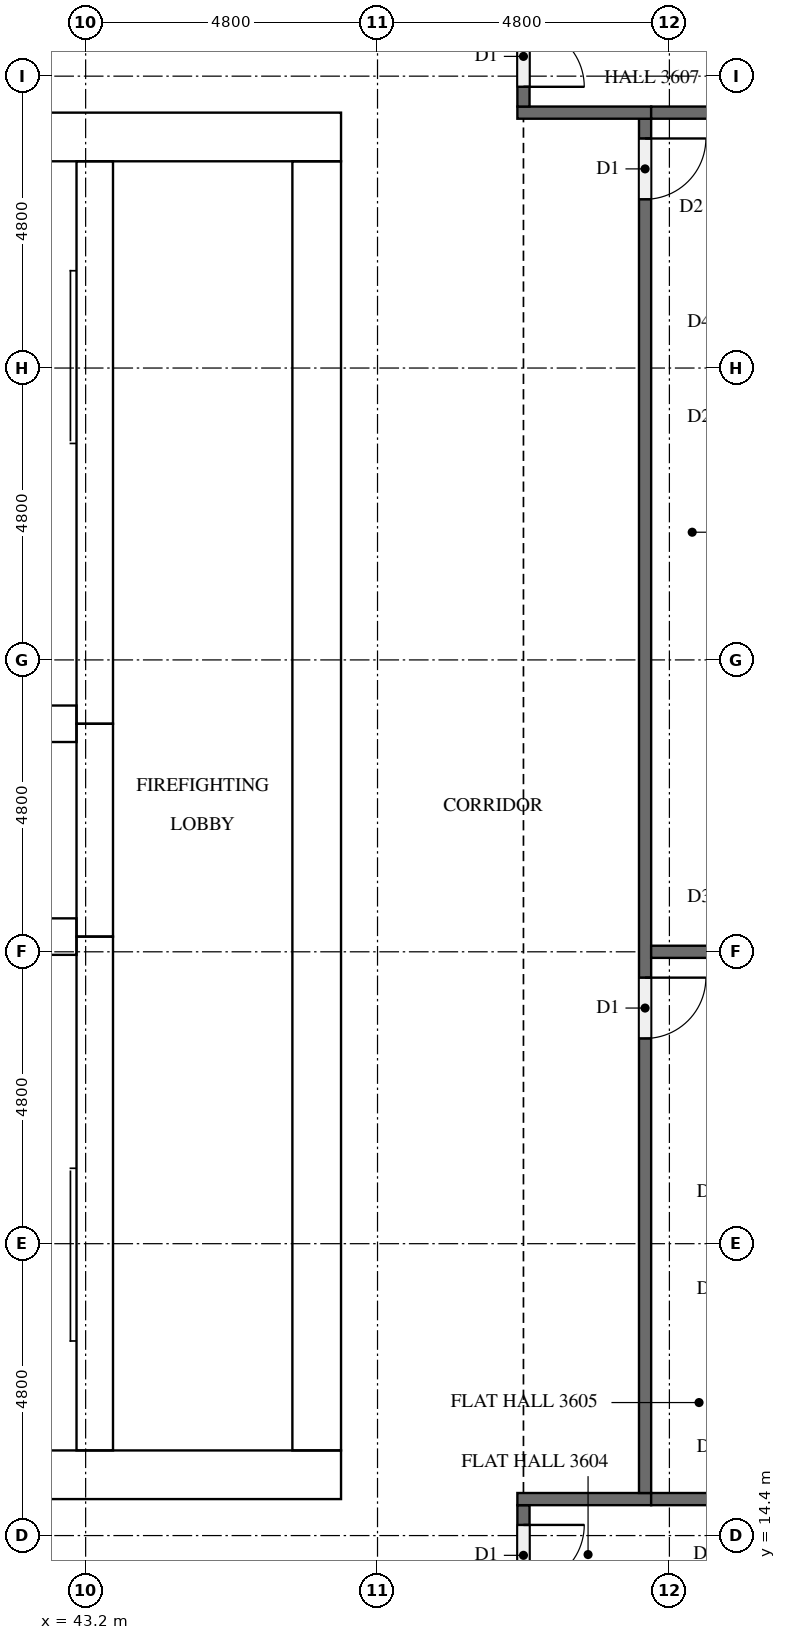
"""IFC4 building model, lengths in metres.
Left out: names, types, materials, properties, quantities, classifications, styles, units other than length and angle.
Written with IfcOpenShell. Run it as: python <this file> out.ifc"""

import sys

from ifc_helpers import new_model, si_unit, direction, frame, frame_2d, origin, place, context, subcontext, project, spatial, rectangle, extrude, element, fill, save


model = new_model("IFC4")
c1 = context("Model", 3, precision=1e-05, world=origin(), true_north=direction((0.0, 1.0)))
c2 = subcontext(c1, "Body", "Model", "MODEL_VIEW")
j1 = project(units=[si_unit("LENGTHUNIT", "METRE"), si_unit("PLANEANGLEUNIT", "RADIAN")], contexts=[c1])
p1 = place(None, origin())
s1 = spatial("IfcSite", under=j1, at=p1, CompositionType="ELEMENT")
p2 = place(p1, origin())
s2 = spatial("IfcBuilding", under=s1, at=p2, CompositionType="ELEMENT")
p3 = place(p2, frame((0.0, 0.0, 140.1)))
s3 = spatial("IfcBuildingStorey", under=s2, at=p3, CompositionType="ELEMENT", Elevation=140.1)
p4 = place(p3, frame((15.0, 15.4, 0.0), z_axis=(0.0, 0.0, 1.0), x_axis=(1.0, 0.0, 0.0)))
e1 = element("IfcWall", 1, at=p4, inside=s3, PredefinedType="SHEAR", context=c2, shape_type="SweptSolid", body=[
    extrude(rectangle(XDim=32.4, YDim=0.8, at=frame_2d((16.2, 0.0))), origin(), (0.0, 0.0, 1.0), 3.1),
])
p5 = place(p4, frame((15.3, 0.0, 0.0)))
e2 = element("IfcOpeningElement", 2, at=p5, cuts=e1, PredefinedType="OPENING", context=c2, shape_type="SweptSolid", body=[
    extrude(rectangle(XDim=1.8, YDim=2.1, at=frame_2d((0.9, 1.05))), frame((0.0, 0.41, 0.0), z_axis=(0.0, -1.0, 0.0), x_axis=(1.0, 0.0, 0.0)), (0.0, 0.0, 1.0), 0.82),
])
p6 = place(p3, frame((15.0, 37.4, 0.0), z_axis=(0.0, 0.0, 1.0), x_axis=(1.0, 0.0, 0.0)))
e3 = element("IfcWall", 3, at=p6, inside=s3, PredefinedType="SHEAR", context=c2, shape_type="SweptSolid", body=[
    extrude(rectangle(XDim=32.4, YDim=0.8, at=frame_2d((16.2, 0.0))), origin(), (0.0, 0.0, 1.0), 3.1),
])
p7 = place(p6, frame((15.3, 0.0, 0.0)))
e4 = element("IfcOpeningElement", 4, at=p7, cuts=e3, PredefinedType="OPENING", context=c2, shape_type="SweptSolid", body=[
    extrude(rectangle(XDim=1.8, YDim=2.1, at=frame_2d((0.9, 1.05))), frame((0.0, 0.41, 0.0), z_axis=(0.0, -1.0, 0.0), x_axis=(1.0, 0.0, 0.0)), (0.0, 0.0, 1.0), 0.82),
])
p8 = place(p6, frame((1.51, 0.0, 0.0)))
e5 = element("IfcOpeningElement", 5, at=p8, cuts=e3, PredefinedType="OPENING", context=c2, shape_type="SweptSolid", body=[
    extrude(rectangle(XDim=1.0, YDim=2.1, at=frame_2d((0.5, 1.05))), frame((0.0, 0.41, 0.0), z_axis=(0.0, -1.0, 0.0), x_axis=(1.0, 0.0, 0.0)), (0.0, 0.0, 1.0), 0.82),
])
p9 = place(p6, frame((5.11, 0.0, 0.0)))
e6 = element("IfcOpeningElement", 6, at=p9, cuts=e3, PredefinedType="OPENING", context=c2, shape_type="SweptSolid", body=[
    extrude(rectangle(XDim=1.0, YDim=2.1, at=frame_2d((0.5, 1.05))), frame((0.0, 0.41, 0.0), z_axis=(0.0, -1.0, 0.0), x_axis=(1.0, 0.0, 0.0)), (0.0, 0.0, 1.0), 0.82),
])
p10 = place(p3, frame((47.0, 15.8, 0.0), z_axis=(0.0, 0.0, 1.0), x_axis=(0.0, 1.0, 0.0)))
e7 = element("IfcWall", 7, at=p10, inside=s3, PredefinedType="SHEAR", context=c2, shape_type="SweptSolid", body=[
    extrude(rectangle(XDim=21.2, YDim=0.8, at=frame_2d((10.6, 0.0))), origin(), (0.0, 0.0, 1.0), 3.1),
])
p11 = place(p10, frame((10.3, 0.0, 0.0)))
e8 = element("IfcOpeningElement", 8, at=p11, cuts=e7, PredefinedType="OPENING", context=c2, shape_type="SweptSolid", body=[
    extrude(rectangle(XDim=1.2, YDim=2.1, at=frame_2d((0.6, 1.05))), frame((0.0, 0.41, 0.0), z_axis=(0.0, -1.0, 0.0), x_axis=(1.0, 0.0, 0.0)), (0.0, 0.0, 1.0), 0.82),
])
p12 = place(p3, frame((43.35, 15.8, 0.0), z_axis=(0.0, 0.0, 1.0), x_axis=(0.0, 1.0, 0.0)))
e9 = element("IfcWall", 9, at=p12, inside=s3, PredefinedType="SHEAR", context=c2, shape_type="SweptSolid", body=[
    extrude(rectangle(XDim=8.45, YDim=0.6, at=frame_2d((4.225, 0.0))), origin(), (0.0, 0.0, 1.0), 3.1),
])
p13 = place(p12, frame((0.4, 0.0, 0.0)))
e10 = element("IfcOpeningElement", 10, at=p13, cuts=e9, PredefinedType="OPENING", context=c2, shape_type="SweptSolid", body=[
    extrude(rectangle(XDim=1.2, YDim=2.1, at=frame_2d((0.6, 1.05))), frame((0.0, 0.31, 0.0), z_axis=(0.0, -1.0, 0.0), x_axis=(1.0, 0.0, 0.0)), (0.0, 0.0, 1.0), 0.62),
])
p14 = place(p3, frame((43.35, 24.25, 0.0), z_axis=(0.0, 0.0, 1.0), x_axis=(0.0, 1.0, 0.0)))
e11 = element("IfcWall", 11, at=p14, inside=s3, PredefinedType="SHEAR", context=c2, shape_type="SweptSolid", body=[
    extrude(rectangle(XDim=3.5, YDim=0.6, at=frame_2d((1.75, 0.0))), origin(), (0.0, 0.0, 1.0), 3.1),
])
p15 = place(p14, frame((1.2, 0.0, 0.0)))
e12 = element("IfcOpeningElement", 12, at=p15, cuts=e11, PredefinedType="OPENING", context=c2, shape_type="SweptSolid", body=[
    extrude(rectangle(XDim=1.1, YDim=2.1, at=frame_2d((0.55, 1.05))), frame((0.0, 0.31, 0.0), z_axis=(0.0, -1.0, 0.0), x_axis=(1.0, 0.0, 0.0)), (0.0, 0.0, 1.0), 0.62),
])
p16 = place(p3, frame((43.35, 27.75, 0.0), z_axis=(0.0, 0.0, 1.0), x_axis=(0.0, 1.0, 0.0)))
e13 = element("IfcWall", 13, at=p16, inside=s3, PredefinedType="SHEAR", context=c2, shape_type="SweptSolid", body=[
    extrude(rectangle(XDim=9.25, YDim=0.6, at=frame_2d((4.625, 0.0))), origin(), (0.0, 0.0, 1.0), 3.1),
])
p17 = place(p16, frame((7.65, 0.0, 0.0)))
e14 = element("IfcOpeningElement", 14, at=p17, cuts=e13, PredefinedType="OPENING", context=c2, shape_type="SweptSolid", body=[
    extrude(rectangle(XDim=1.2, YDim=2.1, at=frame_2d((0.6, 1.05))), frame((0.0, 0.31, 0.0), z_axis=(0.0, -1.0, 0.0), x_axis=(1.0, 0.0, 0.0)), (0.0, 0.0, 1.0), 0.62),
])
for number, where, z_axis, x_axis in (
    (15, (39.6, 24.25, 0.0), (0.0, 0.0, 1.0), (1.0, 0.0, 0.0)),
    (16, (39.6, 27.75, 0.0), (0.0, 0.0, 1.0), (1.0, 0.0, 0.0)),
):
    element("IfcWall", number, at=place(p3, frame(where, z_axis=z_axis, x_axis=x_axis)), inside=s3, PredefinedType="SHEAR", context=c2, shape_type="SweptSolid", body=[
        extrude(rectangle(XDim=3.45, YDim=0.6, at=frame_2d((1.725, 0.0))), origin(), (0.0, 0.0, 1.0), 3.1),
    ])
p18 = place(p3, frame((50.4, 14.9, 0.0), z_axis=(0.0, 0.0, 1.0), x_axis=(0.0, -1.0, 0.0)))
e17 = element("IfcWall", 17, at=p18, inside=s3, PredefinedType="PARTITIONING", context=c2, shape_type="SweptSolid", body=[
    extrude(rectangle(XDim=2.8, YDim=0.2, at=frame_2d((1.4, 0.0))), origin(), (0.0, 0.0, 1.0), 3.1),
])
p19 = place(p18, frame((0.325, 0.0, 0.0)))
e18 = element("IfcOpeningElement", 18, at=p19, cuts=e17, PredefinedType="OPENING", context=c2, shape_type="SweptSolid", body=[
    extrude(rectangle(XDim=1.0, YDim=2.1, at=frame_2d((0.5, 1.05))), frame((0.0, 0.11, 0.0), z_axis=(0.0, -1.0, 0.0), x_axis=(1.0, 0.0, 0.0)), (0.0, 0.0, 1.0), 0.22),
])
p20 = place(p3, frame((50.3, 15.0, 0.0), z_axis=(0.0, 0.0, 1.0), x_axis=(1.0, 0.0, 0.0)))
e19 = element("IfcWall", 19, at=p20, inside=s3, PredefinedType="PARTITIONING", context=c2, shape_type="SweptSolid", body=[
    extrude(rectangle(XDim=2.2, YDim=0.2, at=frame_2d((1.1, 0.0))), origin(), (0.0, 0.0, 1.0), 3.1),
])
p21 = place(p3, frame((52.4, 37.7, 0.0), z_axis=(0.0, 0.0, 1.0), x_axis=(0.0, -1.0, 0.0)))
e20 = element("IfcWall", 20, at=p21, inside=s3, PredefinedType="PARTITIONING", context=c2, shape_type="SweptSolid", body=[
    extrude(rectangle(XDim=22.6, YDim=0.2, at=frame_2d((11.3, 0.0))), origin(), (0.0, 0.0, 1.0), 3.1),
])
p22 = place(p21, frame((14.125, 0.0, 0.0)))
e21 = element("IfcOpeningElement", 21, at=p22, cuts=e20, PredefinedType="OPENING", context=c2, shape_type="SweptSolid", body=[
    extrude(rectangle(XDim=1.0, YDim=2.1, at=frame_2d((0.5, 1.05))), frame((0.0, 0.11, 0.0), z_axis=(0.0, -1.0, 0.0), x_axis=(1.0, 0.0, 0.0)), (0.0, 0.0, 1.0), 0.22),
])
p23 = place(p21, frame((0.325, 0.0, 0.0)))
e22 = element("IfcOpeningElement", 22, at=p23, cuts=e20, PredefinedType="OPENING", context=c2, shape_type="SweptSolid", body=[
    extrude(rectangle(XDim=1.0, YDim=2.1, at=frame_2d((0.5, 1.05))), frame((0.0, 0.11, 0.0), z_axis=(0.0, -1.0, 0.0), x_axis=(1.0, 0.0, 0.0)), (0.0, 0.0, 1.0), 0.22),
])
p24 = place(p3, frame((52.5, 37.8, 0.0), z_axis=(0.0, 0.0, 1.0), x_axis=(-1.0, 0.0, 0.0)))
e23 = element("IfcWall", 23, at=p24, inside=s3, PredefinedType="PARTITIONING", context=c2, shape_type="SweptSolid", body=[
    extrude(rectangle(XDim=2.2, YDim=0.2, at=frame_2d((1.1, 0.0))), origin(), (0.0, 0.0, 1.0), 3.1),
])
p25 = place(p3, frame((50.4, 40.7, 0.0), z_axis=(0.0, 0.0, 1.0), x_axis=(0.0, -1.0, 0.0)))
e24 = element("IfcWall", 24, at=p25, inside=s3, PredefinedType="PARTITIONING", context=c2, shape_type="SweptSolid", body=[
    extrude(rectangle(XDim=2.8, YDim=0.2, at=frame_2d((1.4, 0.0))), origin(), (0.0, 0.0, 1.0), 3.1),
])
p26 = place(p25, frame((1.475, 0.0, 0.0)))
e25 = element("IfcOpeningElement", 25, at=p26, cuts=e24, PredefinedType="OPENING", context=c2, shape_type="SweptSolid", body=[
    extrude(rectangle(XDim=1.0, YDim=2.1, at=frame_2d((0.5, 1.05))), frame((0.0, 0.11, 0.0), z_axis=(0.0, -1.0, 0.0), x_axis=(1.0, 0.0, 0.0)), (0.0, 0.0, 1.0), 0.22),
])
for number, where, z_axis, x_axis in (
    (26, (52.5, 15.0, 0.0), (0.0, 0.0, 1.0), (1.0, 0.0, 0.0)),
    (27, (52.5, 24.0, 0.0), (0.0, 0.0, 1.0), (1.0, 0.0, 0.0)),
):
    element("IfcWall", number, at=place(p3, frame(where, z_axis=z_axis, x_axis=x_axis)), inside=s3, PredefinedType="PARTITIONING", context=c2, shape_type="SweptSolid", body=[
        extrude(rectangle(XDim=5.0, YDim=0.2, at=frame_2d((2.5, 0.0))), origin(), (0.0, 0.0, 1.0), 3.1),
    ])
p27 = place(p3, frame((52.5, 37.8, 0.0), z_axis=(0.0, 0.0, 1.0), x_axis=(1.0, 0.0, 0.0)))
e28 = element("IfcWall", 28, at=p27, inside=s3, PredefinedType="PARTITIONING", context=c2, shape_type="SweptSolid", body=[
    extrude(rectangle(XDim=4.725, YDim=0.2, at=frame_2d((2.363, 0.0))), origin(), (0.0, 0.0, 1.0), 3.1),
])
p28 = place(p15, origin())
e29 = element("IfcDoor", 29, at=p28, inside=s3, OperationType="DOUBLE_DOOR_SLIDING", PredefinedType="DOOR", context=c2, shape_type="SweptSolid", body=[
    extrude(rectangle(XDim=1.1, YDim=2.1, at=frame_2d((0.55, 1.05))), frame((0.0, 0.025, 0.0), z_axis=(0.0, -1.0, 0.0), x_axis=(1.0, 0.0, 0.0)), (0.0, 0.0, 1.0), 0.05),
])
fill(e12, e29)
p29 = place(p13, origin())
e30 = element("IfcDoor", 30, at=p29, inside=s3, OperationType="SINGLE_SWING_LEFT", PredefinedType="DOOR", context=c2, shape_type="SweptSolid", body=[
    extrude(rectangle(XDim=1.2, YDim=2.1, at=frame_2d((0.6, 1.05))), frame((0.0, 0.025, 0.0), z_axis=(0.0, -1.0, 0.0), x_axis=(1.0, 0.0, 0.0)), (0.0, 0.0, 1.0), 0.05),
])
fill(e10, e30)
p30 = place(p17, origin())
e31 = element("IfcDoor", 31, at=p30, inside=s3, OperationType="SINGLE_SWING_RIGHT", PredefinedType="DOOR", context=c2, shape_type="SweptSolid", body=[
    extrude(rectangle(XDim=1.2, YDim=2.1, at=frame_2d((0.6, 1.05))), frame((0.0, 0.025, 0.0), z_axis=(0.0, -1.0, 0.0), x_axis=(1.0, 0.0, 0.0)), (0.0, 0.0, 1.0), 0.05),
])
fill(e14, e31)
p31 = place(p11, origin())
e32 = element("IfcDoor", 32, at=p31, inside=s3, OperationType="SINGLE_SWING_RIGHT", PredefinedType="DOOR", context=c2, shape_type="SweptSolid", body=[
    extrude(rectangle(XDim=1.2, YDim=2.1, at=frame_2d((0.6, 1.05))), frame((0.0, 0.025, 0.0), z_axis=(0.0, -1.0, 0.0), x_axis=(1.0, 0.0, 0.0)), (0.0, 0.0, 1.0), 0.05),
])
fill(e8, e32)
p32 = place(p19, origin())
e33 = element("IfcDoor", 33, at=p32, inside=s3, OperationType="SINGLE_SWING_LEFT", PredefinedType="DOOR", context=c2, shape_type="SweptSolid", body=[
    extrude(rectangle(XDim=1.0, YDim=2.1, at=frame_2d((0.5, 1.05))), frame((0.0, 0.025, 0.0), z_axis=(0.0, -1.0, 0.0), x_axis=(1.0, 0.0, 0.0)), (0.0, 0.0, 1.0), 0.05),
])
fill(e18, e33)
p33 = place(p22, origin())
e34 = element("IfcDoor", 34, at=p33, inside=s3, OperationType="SINGLE_SWING_LEFT", PredefinedType="DOOR", context=c2, shape_type="SweptSolid", body=[
    extrude(rectangle(XDim=1.0, YDim=2.1, at=frame_2d((0.5, 1.05))), frame((0.0, 0.025, 0.0), z_axis=(0.0, -1.0, 0.0), x_axis=(1.0, 0.0, 0.0)), (0.0, 0.0, 1.0), 0.05),
])
fill(e21, e34)
p34 = place(p23, origin())
e35 = element("IfcDoor", 35, at=p34, inside=s3, OperationType="SINGLE_SWING_LEFT", PredefinedType="DOOR", context=c2, shape_type="SweptSolid", body=[
    extrude(rectangle(XDim=1.0, YDim=2.1, at=frame_2d((0.5, 1.05))), frame((0.0, 0.025, 0.0), z_axis=(0.0, -1.0, 0.0), x_axis=(1.0, 0.0, 0.0)), (0.0, 0.0, 1.0), 0.05),
])
fill(e22, e35)
p35 = place(p26, origin())
e36 = element("IfcDoor", 36, at=p35, inside=s3, OperationType="SINGLE_SWING_RIGHT", PredefinedType="DOOR", context=c2, shape_type="SweptSolid", body=[
    extrude(rectangle(XDim=1.0, YDim=2.1, at=frame_2d((0.5, 1.05))), frame((0.0, 0.025, 0.0), z_axis=(0.0, -1.0, 0.0), x_axis=(1.0, 0.0, 0.0)), (0.0, 0.0, 1.0), 0.05),
])
fill(e25, e36)
save(model, sys.argv[1])
